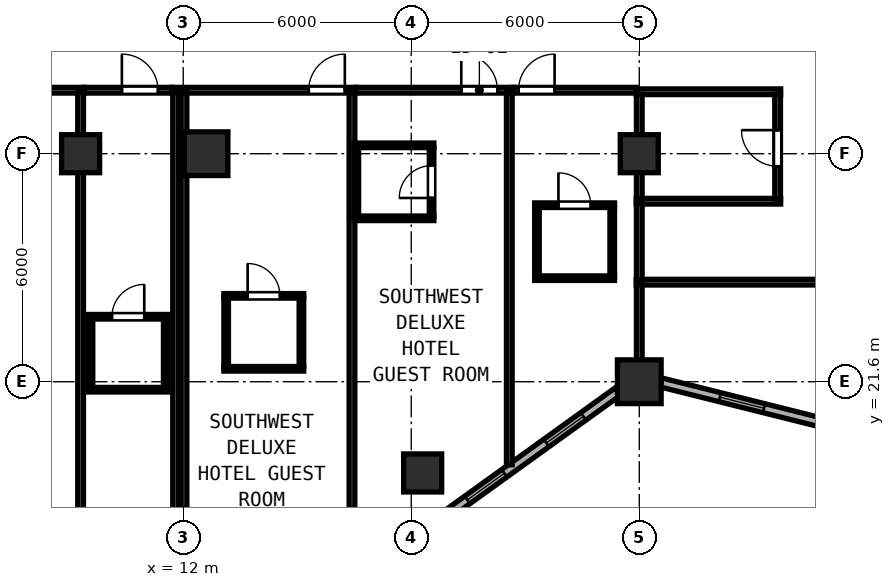
"""IFC4 building model, lengths in metres.
Left out: names, types, materials, properties, quantities, classifications, styles, units other than length and angle.
Written with IfcOpenShell. Run it as: python <this file> out.ifc"""

import sys

from ifc_helpers import new_model, si_unit, direction, frame, frame_2d, origin, origin_2d, place, context, subcontext, project, spatial, rectangle, hollow_rectangle, extrude, element, fill, save


model = new_model("IFC4")
c1 = context("Model", 3, precision=1e-05, world=origin(), true_north=direction((0.0, 1.0)))
c2 = subcontext(c1, "Body", "Model", "MODEL_VIEW")
j1 = project(units=[si_unit("LENGTHUNIT", "METRE"), si_unit("PLANEANGLEUNIT", "RADIAN")], contexts=[c1])
p1 = place(None, origin())
s1 = spatial("IfcSite", under=j1, at=p1, CompositionType="ELEMENT")
p2 = place(p1, origin())
s2 = spatial("IfcBuilding", under=s1, at=p2, CompositionType="ELEMENT")
p3 = place(p2, frame((0.0, 0.0, 62.8)))
s3 = spatial("IfcBuildingStorey", under=s2, at=p3, CompositionType="ELEMENT", Elevation=62.8)
for number, where, z_axis, x_axis in (
    (1, (24.0, 21.6, 0.0), (0.0, 0.0, 1.0), (1.0, 0.0, 0.0)),
    (2, (12.6, 27.6, 0.0), (0.0, 0.0, 1.0), (1.0, 0.0, 0.0)),
):
    element("IfcColumn", number, at=place(p3, frame(where, z_axis=z_axis, x_axis=x_axis)), inside=s3, PredefinedType="COLUMN", context=c2, shape_type="SweptSolid", body=[
        extrude(hollow_rectangle(XDim=1.15, YDim=1.15, WallThickness=0.042, at=origin_2d()), origin(), (0.0, 0.0, 1.0), 3.8),
    ])
for number, where, z_axis, x_axis in (
    (3, (24.0, 27.6, 0.0), (0.0, 0.0, 1.0), (1.0, 0.0, 0.0)),
    (4, (18.3, 19.2, 0.0), (0.0, 0.0, 1.0), (1.0, 0.0, 0.0)),
    (5, (9.3, 27.6, 0.0), (0.0, 0.0, 1.0), (1.0, 0.0, 0.0)),
):
    element("IfcColumn", number, at=place(p3, frame(where, z_axis=z_axis, x_axis=x_axis)), inside=s3, PredefinedType="COLUMN", context=c2, shape_type="SweptSolid", body=[
        extrude(hollow_rectangle(XDim=1.0, YDim=1.0, WallThickness=0.038, at=origin_2d()), origin(), (0.0, 0.0, 1.0), 3.8),
    ])
p4 = place(p3, frame((14.075, 14.602, 0.0), z_axis=(0.0, 0.0, 1.0), x_axis=(0.811543176492, 0.58429245476, 0.0)))
e6 = element("IfcWall", 6, at=p4, inside=s3, PredefinedType="SOLIDWALL", context=c2, shape_type="SweptSolid", body=[
    extrude(rectangle(XDim=11.531, YDim=0.24, at=frame_2d((5.765, 0.0))), origin(), (0.0, 0.0, 1.0), 3.097),
])
p5 = place(p4, frame((1.554, 0.0, 0.85)))
e7 = element("IfcOpeningElement", 7, at=p5, cuts=e6, PredefinedType="OPENING", context=c2, shape_type="SweptSolid", body=[
    extrude(rectangle(XDim=1.2, YDim=1.85, at=frame_2d((0.6, 0.925))), frame((0.0, 0.13, 0.0), z_axis=(0.0, -1.0, 0.0), x_axis=(1.0, 0.0, 0.0)), (0.0, 0.0, 1.0), 0.26),
])
p6 = place(p4, frame((6.656, 0.0, 0.85)))
e8 = element("IfcOpeningElement", 8, at=p6, cuts=e6, PredefinedType="OPENING", context=c2, shape_type="SweptSolid", body=[
    extrude(rectangle(XDim=1.2, YDim=1.85, at=frame_2d((0.6, 0.925))), frame((0.0, 0.13, 0.0), z_axis=(0.0, -1.0, 0.0), x_axis=(1.0, 0.0, 0.0)), (0.0, 0.0, 1.0), 0.26),
])
p7 = place(p4, frame((9.218, 0.0, 0.85)))
e9 = element("IfcOpeningElement", 9, at=p7, cuts=e6, PredefinedType="OPENING", context=c2, shape_type="SweptSolid", body=[
    extrude(rectangle(XDim=1.2, YDim=1.85, at=frame_2d((0.6, 0.925))), frame((0.0, 0.13, 0.0), z_axis=(0.0, -1.0, 0.0), x_axis=(1.0, 0.0, 0.0)), (0.0, 0.0, 1.0), 0.26),
])
p8 = place(p3, frame((24.567, 21.582, 0.0), z_axis=(0.0, 0.0, 1.0), x_axis=(0.970148978127, -0.24250971164, 0.0)))
e10 = element("IfcWall", 10, at=p8, inside=s3, PredefinedType="SOLIDWALL", context=c2, shape_type="SweptSolid", body=[
    extrude(rectangle(XDim=4.434, YDim=0.24, at=frame_2d((2.217, 0.0))), origin(), (0.0, 0.0, 1.0), 3.097),
])
p9 = place(p8, frame((1.6, 0.0, 0.85)))
e11 = element("IfcOpeningElement", 11, at=p9, cuts=e10, PredefinedType="OPENING", context=c2, shape_type="SweptSolid", body=[
    extrude(rectangle(XDim=1.2, YDim=1.85, at=frame_2d((0.6, 0.925))), frame((0.0, 0.13, 0.0), z_axis=(0.0, -1.0, 0.0), x_axis=(1.0, 0.0, 0.0)), (0.0, 0.0, 1.0), 0.26),
])
for number, where, z_axis, x_axis in (
    (12, (23.92, 29.23, 0.0), (0.0, 0.0, 1.0), (1.0, 0.0, 0.0)),
    (13, (23.92, 26.35, 0.0), (0.0, 0.0, 1.0), (1.0, 0.0, 0.0)),
):
    element("IfcWall", number, at=place(p3, frame(where, z_axis=z_axis, x_axis=x_axis)), inside=s3, PredefinedType="PARTITIONING", context=c2, shape_type="SweptSolid", body=[
        extrude(rectangle(XDim=3.8, YDim=0.15, at=frame_2d((1.9, 0.0))), origin(), (0.0, 0.0, 1.0), 3.6),
    ])
p10 = place(p3, frame((24.0, 26.41, 0.0), z_axis=(0.0, 0.0, 1.0), x_axis=(0.0, 1.0, 0.0)))
e14 = element("IfcWall", 14, at=p10, inside=s3, PredefinedType="PARTITIONING", context=c2, shape_type="SweptSolid", body=[
    extrude(rectangle(XDim=2.76, YDim=0.15, at=frame_2d((1.38, 0.0))), origin(), (0.0, 0.0, 1.0), 3.097),
])
p11 = place(p3, frame((27.64, 26.41, 0.0), z_axis=(0.0, 0.0, 1.0), x_axis=(0.0, 1.0, 0.0)))
e15 = element("IfcWall", 15, at=p11, inside=s3, PredefinedType="PARTITIONING", context=c2, shape_type="SweptSolid", body=[
    extrude(rectangle(XDim=2.76, YDim=0.15, at=frame_2d((1.38, 0.0))), origin(), (0.0, 0.0, 1.0), 3.6),
])
p12 = place(p11, frame((1.81, 0.0, 0.0), z_axis=(0.0, 0.0, 1.0), x_axis=(-1.0, 0.0, 0.0)))
e16 = element("IfcOpeningElement", 16, at=p12, cuts=e15, PredefinedType="OPENING", context=c2, shape_type="SweptSolid", body=[
    extrude(rectangle(XDim=0.95, YDim=2.12, at=frame_2d((0.475, 1.06))), frame((0.0, 0.085, 0.0), z_axis=(0.0, -1.0, 0.0), x_axis=(1.0, 0.0, 0.0)), (0.0, 0.0, 1.0), 0.17),
])
p13 = place(p3, frame((23.92, 24.22, 0.0), z_axis=(0.0, 0.0, 1.0), x_axis=(1.0, 0.0, 0.0)))
e17 = element("IfcWall", 17, at=p13, inside=s3, PredefinedType="PARTITIONING", context=c2, shape_type="SweptSolid", body=[
    extrude(rectangle(XDim=14.56, YDim=0.15, at=frame_2d((7.28, 0.0))), origin(), (0.0, 0.0, 1.0), 3.6),
])
p14 = place(p13, frame((9.445, 0.0, 0.0), z_axis=(0.0, 0.0, 1.0), x_axis=(-1.0, 0.0, 0.0)))
e18 = element("IfcOpeningElement", 18, at=p14, cuts=e17, PredefinedType="OPENING", context=c2, shape_type="SweptSolid", body=[
    extrude(rectangle(XDim=0.95, YDim=2.12, at=frame_2d((0.475, 1.06))), frame((0.0, 0.085, 0.0), z_axis=(0.0, -1.0, 0.0), x_axis=(1.0, 0.0, 0.0)), (0.0, 0.0, 1.0), 0.17),
])
p15 = place(p3, frame((24.0, 21.819, 0.0), z_axis=(0.0, 0.0, 1.0), x_axis=(0.0, 1.0, 0.0)))
e19 = element("IfcWall", 19, at=p15, inside=s3, PredefinedType="PARTITIONING", context=c2, shape_type="SweptSolid", body=[
    extrude(rectangle(XDim=2.341, YDim=0.15, at=frame_2d((1.171, 0.0))), origin(), (0.0, 0.0, 1.0), 3.097),
])
p16 = place(p3, frame((11.7, 29.27, 0.0), z_axis=(0.0, 0.0, 1.0), x_axis=(1.0, 0.0, 0.0)))
e20 = element("IfcWall", 20, at=p16, inside=s3, PredefinedType="PARTITIONING", context=c2, shape_type="SweptSolid", body=[
    extrude(rectangle(XDim=4.84, YDim=0.15, at=frame_2d((2.42, 0.0))), origin(), (0.0, 0.0, 1.0), 3.6),
])
p17 = place(p16, frame((4.552, 0.0, 0.0), z_axis=(0.0, 0.0, 1.0), x_axis=(-1.0, 0.0, 0.0)))
e21 = element("IfcOpeningElement", 21, at=p17, cuts=e20, PredefinedType="OPENING", context=c2, shape_type="SweptSolid", body=[
    extrude(rectangle(XDim=0.95, YDim=2.15, at=frame_2d((0.475, 1.075))), frame((0.0, 0.085, 0.0), z_axis=(0.0, -1.0, 0.0), x_axis=(1.0, 0.0, 0.0)), (0.0, 0.0, 1.0), 0.17),
])
p18 = place(p3, frame((11.8, 16.642, 0.0), z_axis=(0.0, 0.0, 1.0), x_axis=(0.0, 1.0, 0.0)))
e22 = element("IfcWall", 22, at=p18, inside=s3, PredefinedType="PARTITIONING", context=c2, shape_type="SweptSolid", body=[
    extrude(rectangle(XDim=12.568, YDim=0.15, at=frame_2d((6.284, 0.0))), origin(), (0.0, 0.0, 1.0), 3.6),
])
p19 = place(p3, frame((16.44, 16.434, 0.0), z_axis=(0.0, 0.0, 1.0), x_axis=(0.0, 1.0, 0.0)))
e23 = element("IfcWall", 23, at=p19, inside=s3, PredefinedType="PARTITIONING", context=c2, shape_type="SweptSolid", body=[
    extrude(rectangle(XDim=12.776, YDim=0.15, at=frame_2d((6.388, 0.0))), origin(), (0.0, 0.0, 1.0), 3.6),
])
p20 = place(p3, frame((13.07, 23.86, 0.0), z_axis=(0.0, 0.0, 1.0), x_axis=(1.0, 0.0, 0.0)))
e24 = element("IfcWall", 24, at=p20, inside=s3, PredefinedType="PARTITIONING", context=c2, shape_type="SweptSolid", body=[
    extrude(rectangle(XDim=2.1, YDim=0.12, at=frame_2d((1.05, 0.0))), origin(), (0.0, 0.0, 1.0), 3.6),
])
p21 = place(p20, frame((1.475, 0.0, 0.0), z_axis=(0.0, 0.0, 1.0), x_axis=(-1.0, 0.0, 0.0)))
e25 = element("IfcOpeningElement", 25, at=p21, cuts=e24, PredefinedType="OPENING", context=c2, shape_type="SweptSolid", body=[
    extrude(rectangle(XDim=0.85, YDim=2.1, at=frame_2d((0.425, 1.05))), frame((0.0, 0.07, 0.0), z_axis=(0.0, -1.0, 0.0), x_axis=(1.0, 0.0, 0.0)), (0.0, 0.0, 1.0), 0.14),
])
p22 = place(p3, frame((13.07, 21.94, 0.0), z_axis=(0.0, 0.0, 1.0), x_axis=(1.0, 0.0, 0.0)))
e26 = element("IfcWall", 26, at=p22, inside=s3, PredefinedType="PARTITIONING", context=c2, shape_type="SweptSolid", body=[
    extrude(rectangle(XDim=2.1, YDim=0.12, at=frame_2d((1.05, 0.0))), origin(), (0.0, 0.0, 1.0), 3.6),
])
for number, where, z_axis, x_axis in (
    (27, (13.13, 21.985, 0.0), (0.0, 0.0, 1.0), (0.0, 1.0, 0.0)),
    (28, (15.11, 21.985, 0.0), (0.0, 0.0, 1.0), (0.0, 1.0, 0.0)),
):
    element("IfcWall", number, at=place(p3, frame(where, z_axis=z_axis, x_axis=x_axis)), inside=s3, PredefinedType="PARTITIONING", context=c2, shape_type="SweptSolid", body=[
        extrude(rectangle(XDim=1.83, YDim=0.12, at=frame_2d((0.915, 0.0))), origin(), (0.0, 0.0, 1.0), 3.6),
    ])
p23 = place(p3, frame((16.542, 29.27, 0.0), z_axis=(0.0, 0.0, 1.0), x_axis=(1.0, 0.0, 0.0)))
e29 = element("IfcWall", 29, at=p23, inside=s3, PredefinedType="PARTITIONING", context=c2, shape_type="SweptSolid", body=[
    extrude(rectangle(XDim=4.138, YDim=0.15, at=frame_2d((2.069, 0.0))), origin(), (0.0, 0.0, 1.0), 3.6),
])
p24 = place(p23, frame((3.725, 0.0, 0.0), z_axis=(0.0, 0.0, 1.0), x_axis=(-1.0, 0.0, 0.0)))
e30 = element("IfcOpeningElement", 30, at=p24, cuts=e29, PredefinedType="OPENING", context=c2, shape_type="SweptSolid", body=[
    extrude(rectangle(XDim=0.95, YDim=2.15, at=frame_2d((0.475, 1.075))), frame((0.0, 0.085, 0.0), z_axis=(0.0, -1.0, 0.0), x_axis=(1.0, 0.0, 0.0)), (0.0, 0.0, 1.0), 0.17),
])
p25 = place(p3, frame((20.58, 19.415, 0.0), z_axis=(0.0, 0.0, 1.0), x_axis=(0.0, 1.0, 0.0)))
e31 = element("IfcWall", 31, at=p25, inside=s3, PredefinedType="PARTITIONING", context=c2, shape_type="SweptSolid", body=[
    extrude(rectangle(XDim=9.795, YDim=0.15, at=frame_2d((4.897, 0.0))), origin(), (0.0, 0.0, 1.0), 3.6),
])
p26 = place(p3, frame((16.5, 27.82, 0.0), z_axis=(0.0, 0.0, 1.0), x_axis=(1.0, 0.0, 0.0)))
e32 = element("IfcWall", 32, at=p26, inside=s3, PredefinedType="PARTITIONING", context=c2, shape_type="SweptSolid", body=[
    extrude(rectangle(XDim=2.095, YDim=0.12, at=frame_2d((1.047, 0.0))), origin(), (0.0, 0.0, 1.0), 3.097),
])
p27 = place(p3, frame((16.5, 25.9, 0.0), z_axis=(0.0, 0.0, 1.0), x_axis=(1.0, 0.0, 0.0)))
e33 = element("IfcWall", 33, at=p27, inside=s3, PredefinedType="PARTITIONING", context=c2, shape_type="SweptSolid", body=[
    extrude(rectangle(XDim=2.095, YDim=0.12, at=frame_2d((1.047, 0.0))), origin(), (0.0, 0.0, 1.0), 3.6),
])
p28 = place(p3, frame((16.555, 25.945, 0.0), z_axis=(0.0, 0.0, 1.0), x_axis=(0.0, 1.0, 0.0)))
e34 = element("IfcWall", 34, at=p28, inside=s3, PredefinedType="PARTITIONING", context=c2, shape_type="SweptSolid", body=[
    extrude(rectangle(XDim=1.83, YDim=0.12, at=frame_2d((0.915, 0.0))), origin(), (0.0, 0.0, 1.0), 3.6),
])
p29 = place(p3, frame((18.535, 25.945, 0.0), z_axis=(0.0, 0.0, 1.0), x_axis=(0.0, 1.0, 0.0)))
e35 = element("IfcWall", 35, at=p29, inside=s3, PredefinedType="PARTITIONING", context=c2, shape_type="SweptSolid", body=[
    extrude(rectangle(XDim=1.83, YDim=0.12, at=frame_2d((0.915, 0.0))), origin(), (0.0, 0.0, 1.0), 3.6),
])
p30 = place(p29, frame((0.49, 0.0, 0.0)))
e36 = element("IfcOpeningElement", 36, at=p30, cuts=e35, PredefinedType="OPENING", context=c2, shape_type="SweptSolid", body=[
    extrude(rectangle(XDim=0.85, YDim=2.1, at=frame_2d((0.425, 1.05))), frame((0.0, 0.07, 0.0), z_axis=(0.0, -1.0, 0.0), x_axis=(1.0, 0.0, 0.0)), (0.0, 0.0, 1.0), 0.14),
])
p31 = place(p3, frame((20.682, 29.27, 0.0), z_axis=(0.0, 0.0, 1.0), x_axis=(1.0, 0.0, 0.0)))
e37 = element("IfcWall", 37, at=p31, inside=s3, PredefinedType="PARTITIONING", context=c2, shape_type="SweptSolid", body=[
    extrude(rectangle(XDim=3.236, YDim=0.15, at=frame_2d((1.618, 0.0))), origin(), (0.0, 0.0, 1.0), 3.6),
])
p32 = place(p31, frame((1.09, 0.0, 0.0), z_axis=(0.0, 0.0, 1.0), x_axis=(-1.0, 0.0, 0.0)))
e38 = element("IfcOpeningElement", 38, at=p32, cuts=e37, PredefinedType="OPENING", context=c2, shape_type="SweptSolid", body=[
    extrude(rectangle(XDim=0.95, YDim=2.15, at=frame_2d((0.475, 1.075))), frame((0.0, 0.085, 0.0), z_axis=(0.0, -1.0, 0.0), x_axis=(1.0, 0.0, 0.0)), (0.0, 0.0, 1.0), 0.17),
])
p33 = place(p3, frame((24.0, 24.28, 0.0), z_axis=(0.0, 0.0, 1.0), x_axis=(0.0, 1.0, 0.0)))
e39 = element("IfcWall", 39, at=p33, inside=s3, PredefinedType="PARTITIONING", context=c2, shape_type="SweptSolid", body=[
    extrude(rectangle(XDim=2.01, YDim=0.15, at=frame_2d((1.005, 0.0))), origin(), (0.0, 0.0, 1.0), 3.097),
])
p34 = place(p3, frame((21.248, 26.245, 0.0), z_axis=(0.0, 0.0, 1.0), x_axis=(1.0, 0.0, 0.0)))
e40 = element("IfcWall", 40, at=p34, inside=s3, PredefinedType="PARTITIONING", context=c2, shape_type="SweptSolid", body=[
    extrude(rectangle(XDim=2.1, YDim=0.12, at=frame_2d((1.05, 0.0))), origin(), (0.0, 0.0, 1.0), 3.6),
])
p35 = place(p34, frame((1.475, 0.0, 0.0), z_axis=(0.0, 0.0, 1.0), x_axis=(-1.0, 0.0, 0.0)))
e41 = element("IfcOpeningElement", 41, at=p35, cuts=e40, PredefinedType="OPENING", context=c2, shape_type="SweptSolid", body=[
    extrude(rectangle(XDim=0.85, YDim=2.1, at=frame_2d((0.425, 1.05))), frame((0.0, 0.07, 0.0), z_axis=(0.0, -1.0, 0.0), x_axis=(1.0, 0.0, 0.0)), (0.0, 0.0, 1.0), 0.14),
])
p36 = place(p3, frame((21.248, 24.325, 0.0), z_axis=(0.0, 0.0, 1.0), x_axis=(1.0, 0.0, 0.0)))
e42 = element("IfcWall", 42, at=p36, inside=s3, PredefinedType="PARTITIONING", context=c2, shape_type="SweptSolid", body=[
    extrude(rectangle(XDim=2.1, YDim=0.12, at=frame_2d((1.05, 0.0))), origin(), (0.0, 0.0, 1.0), 3.6),
])
for number, where, z_axis, x_axis in (
    (43, (21.308, 24.37, 0.0), (0.0, 0.0, 1.0), (0.0, 1.0, 0.0)),
    (44, (23.288, 24.37, 0.0), (0.0, 0.0, 1.0), (0.0, 1.0, 0.0)),
):
    element("IfcWall", number, at=place(p3, frame(where, z_axis=z_axis, x_axis=x_axis)), inside=s3, PredefinedType="PARTITIONING", context=c2, shape_type="SweptSolid", body=[
        extrude(rectangle(XDim=1.83, YDim=0.12, at=frame_2d((0.915, 0.0))), origin(), (0.0, 0.0, 1.0), 3.6),
    ])
p37 = place(p3, frame((1.936, 29.27, 0.0), z_axis=(0.0, 0.0, 1.0), x_axis=(1.0, 0.0, 0.0)))
e45 = element("IfcWall", 45, at=p37, inside=s3, PredefinedType="PARTITIONING", context=c2, shape_type="SweptSolid", body=[
    extrude(rectangle(XDim=7.464, YDim=0.15, at=frame_2d((3.732, 0.0))), origin(), (0.0, 0.0, 1.0), 3.6),
])
p38 = place(p37, frame((6.168, 0.0, 0.0), z_axis=(0.0, 0.0, 1.0), x_axis=(-1.0, 0.0, 0.0)))
e46 = element("IfcOpeningElement", 46, at=p38, cuts=e45, PredefinedType="OPENING", context=c2, shape_type="SweptSolid", body=[
    extrude(rectangle(XDim=0.95, YDim=2.18, at=frame_2d((0.475, 1.09))), frame((0.0, 0.085, 0.0), z_axis=(0.0, -1.0, 0.0), x_axis=(1.0, 0.0, 0.0)), (0.0, 0.0, 1.0), 0.17),
])
p39 = place(p3, frame((9.3, 12.188, 0.0), z_axis=(0.0, 0.0, 1.0), x_axis=(0.0, 1.0, 0.0)))
e47 = element("IfcWall", 47, at=p39, inside=s3, PredefinedType="PARTITIONING", context=c2, shape_type="SweptSolid", body=[
    extrude(rectangle(XDim=17.022, YDim=0.15, at=frame_2d((8.511, 0.0))), origin(), (0.0, 0.0, 1.0), 3.6),
])
p40 = place(p3, frame((9.402, 29.27, 0.0), z_axis=(0.0, 0.0, 1.0), x_axis=(1.0, 0.0, 0.0)))
e48 = element("IfcWall", 48, at=p40, inside=s3, PredefinedType="PARTITIONING", context=c2, shape_type="SweptSolid", body=[
    extrude(rectangle(XDim=2.296, YDim=0.15, at=frame_2d((1.148, 0.0))), origin(), (0.0, 0.0, 1.0), 3.6),
])
p41 = place(p40, frame((1.934, 0.0, 0.0), z_axis=(0.0, 0.0, 1.0), x_axis=(-1.0, 0.0, 0.0)))
e49 = element("IfcOpeningElement", 49, at=p41, cuts=e48, PredefinedType="OPENING", context=c2, shape_type="SweptSolid", body=[
    extrude(rectangle(XDim=0.95, YDim=2.15, at=frame_2d((0.475, 1.075))), frame((0.0, 0.085, 0.0), z_axis=(0.0, -1.0, 0.0), x_axis=(1.0, 0.0, 0.0)), (0.0, 0.0, 1.0), 0.17),
])
p42 = place(p3, frame((12.02, 16.612, 0.0), z_axis=(0.0, 0.0, 1.0), x_axis=(0.0, 1.0, 0.0)))
e50 = element("IfcWall", 50, at=p42, inside=s3, PredefinedType="PARTITIONING", context=c2, shape_type="SweptSolid", body=[
    extrude(rectangle(XDim=12.598, YDim=0.15, at=frame_2d((6.299, 0.0))), origin(), (0.0, 0.0, 1.0), 3.6),
])
p43 = place(p3, frame((9.5, 23.31, 0.0), z_axis=(0.0, 0.0, 1.0), x_axis=(1.0, 0.0, 0.0)))
e51 = element("IfcWall", 51, at=p43, inside=s3, PredefinedType="PARTITIONING", context=c2, shape_type="SweptSolid", body=[
    extrude(rectangle(XDim=2.1, YDim=0.12, at=frame_2d((1.05, 0.0))), origin(), (0.0, 0.0, 1.0), 3.6),
])
p44 = place(p43, frame((1.475, 0.0, 0.0), z_axis=(0.0, 0.0, 1.0), x_axis=(-1.0, 0.0, 0.0)))
e52 = element("IfcOpeningElement", 52, at=p44, cuts=e51, PredefinedType="OPENING", context=c2, shape_type="SweptSolid", body=[
    extrude(rectangle(XDim=0.85, YDim=2.1, at=frame_2d((0.425, 1.05))), frame((0.0, 0.07, 0.0), z_axis=(0.0, -1.0, 0.0), x_axis=(1.0, 0.0, 0.0)), (0.0, 0.0, 1.0), 0.14),
])
p45 = place(p3, frame((9.5, 21.39, 0.0), z_axis=(0.0, 0.0, 1.0), x_axis=(1.0, 0.0, 0.0)))
e53 = element("IfcWall", 53, at=p45, inside=s3, PredefinedType="PARTITIONING", context=c2, shape_type="SweptSolid", body=[
    extrude(rectangle(XDim=2.1, YDim=0.12, at=frame_2d((1.05, 0.0))), origin(), (0.0, 0.0, 1.0), 3.6),
])
for number, where, z_axis, x_axis in (
    (54, (9.56, 21.435, 0.0), (0.0, 0.0, 1.0), (0.0, 1.0, 0.0)),
    (55, (11.54, 21.435, 0.0), (0.0, 0.0, 1.0), (0.0, 1.0, 0.0)),
):
    element("IfcWall", number, at=place(p3, frame(where, z_axis=z_axis, x_axis=x_axis)), inside=s3, PredefinedType="PARTITIONING", context=c2, shape_type="SweptSolid", body=[
        extrude(rectangle(XDim=1.83, YDim=0.12, at=frame_2d((0.915, 0.0))), origin(), (0.0, 0.0, 1.0), 3.6),
    ])
p46 = place(p6, origin())
e56 = element("IfcWindow", 56, at=p46, inside=s3, PartitioningType="SINGLE_PANEL", PredefinedType="WINDOW", context=c2, shape_type="SweptSolid", body=[
    extrude(rectangle(XDim=1.2, YDim=1.85, at=frame_2d((0.6, 0.925))), frame((0.0, 0.03, 0.0), z_axis=(0.0, -1.0, 0.0), x_axis=(1.0, 0.0, 0.0)), (0.0, 0.0, 1.0), 0.06),
])
fill(e8, e56)
p47 = place(p9, origin())
e57 = element("IfcWindow", 57, at=p47, inside=s3, PartitioningType="SINGLE_PANEL", PredefinedType="WINDOW", context=c2, shape_type="SweptSolid", body=[
    extrude(rectangle(XDim=1.2, YDim=1.85, at=frame_2d((0.6, 0.925))), frame((0.0, 0.03, 0.0), z_axis=(0.0, -1.0, 0.0), x_axis=(1.0, 0.0, 0.0)), (0.0, 0.0, 1.0), 0.06),
])
fill(e11, e57)
p48 = place(p12, origin())
e58 = element("IfcDoor", 58, at=p48, inside=s3, OperationType="SINGLE_SWING_LEFT", PredefinedType="DOOR", context=c2, shape_type="SweptSolid", body=[
    extrude(rectangle(XDim=0.95, YDim=2.12, at=frame_2d((0.475, 1.06))), frame((0.0, 0.025, 0.0), z_axis=(0.0, -1.0, 0.0), x_axis=(1.0, 0.0, 0.0)), (0.0, 0.0, 1.0), 0.05),
])
fill(e16, e58)
p49 = place(p17, origin())
e59 = element("IfcDoor", 59, at=p49, inside=s3, OperationType="SINGLE_SWING_LEFT", PredefinedType="DOOR", context=c2, shape_type="SweptSolid", body=[
    extrude(rectangle(XDim=0.95, YDim=2.15, at=frame_2d((0.475, 1.075))), frame((0.0, 0.025, 0.0), z_axis=(0.0, -1.0, 0.0), x_axis=(1.0, 0.0, 0.0)), (0.0, 0.0, 1.0), 0.05),
])
fill(e21, e59)
p50 = place(p21, origin())
e60 = element("IfcDoor", 60, at=p50, inside=s3, OperationType="SINGLE_SWING_RIGHT", PredefinedType="DOOR", context=c2, shape_type="SweptSolid", body=[
    extrude(rectangle(XDim=0.85, YDim=2.1, at=frame_2d((0.425, 1.05))), frame((0.0, 0.025, 0.0), z_axis=(0.0, -1.0, 0.0), x_axis=(1.0, 0.0, 0.0)), (0.0, 0.0, 1.0), 0.05),
])
fill(e25, e60)
p51 = place(p24, origin())
e61 = element("IfcDoor", 61, at=p51, inside=s3, OperationType="SINGLE_SWING_RIGHT", PredefinedType="DOOR", context=c2, shape_type="SweptSolid", body=[
    extrude(rectangle(XDim=0.95, YDim=2.15, at=frame_2d((0.475, 1.075))), frame((0.0, 0.025, 0.0), z_axis=(0.0, -1.0, 0.0), x_axis=(1.0, 0.0, 0.0)), (0.0, 0.0, 1.0), 0.05),
])
fill(e30, e61)
p52 = place(p30, origin())
e62 = element("IfcDoor", 62, at=p52, inside=s3, OperationType="SINGLE_SWING_LEFT", PredefinedType="DOOR", context=c2, shape_type="SweptSolid", body=[
    extrude(rectangle(XDim=0.85, YDim=2.1, at=frame_2d((0.425, 1.05))), frame((0.0, 0.025, 0.0), z_axis=(0.0, -1.0, 0.0), x_axis=(1.0, 0.0, 0.0)), (0.0, 0.0, 1.0), 0.05),
])
fill(e36, e62)
p53 = place(p32, origin())
e63 = element("IfcDoor", 63, at=p53, inside=s3, OperationType="SINGLE_SWING_LEFT", PredefinedType="DOOR", context=c2, shape_type="SweptSolid", body=[
    extrude(rectangle(XDim=0.95, YDim=2.15, at=frame_2d((0.475, 1.075))), frame((0.0, 0.025, 0.0), z_axis=(0.0, -1.0, 0.0), x_axis=(1.0, 0.0, 0.0)), (0.0, 0.0, 1.0), 0.05),
])
fill(e38, e63)
p54 = place(p35, origin())
e64 = element("IfcDoor", 64, at=p54, inside=s3, OperationType="SINGLE_SWING_RIGHT", PredefinedType="DOOR", context=c2, shape_type="SweptSolid", body=[
    extrude(rectangle(XDim=0.85, YDim=2.1, at=frame_2d((0.425, 1.05))), frame((0.0, 0.025, 0.0), z_axis=(0.0, -1.0, 0.0), x_axis=(1.0, 0.0, 0.0)), (0.0, 0.0, 1.0), 0.05),
])
fill(e41, e64)
p55 = place(p41, origin())
e65 = element("IfcDoor", 65, at=p55, inside=s3, OperationType="SINGLE_SWING_RIGHT", PredefinedType="DOOR", context=c2, shape_type="SweptSolid", body=[
    extrude(rectangle(XDim=0.95, YDim=2.15, at=frame_2d((0.475, 1.075))), frame((0.0, 0.025, 0.0), z_axis=(0.0, -1.0, 0.0), x_axis=(1.0, 0.0, 0.0)), (0.0, 0.0, 1.0), 0.05),
])
fill(e49, e65)
p56 = place(p44, origin())
e66 = element("IfcDoor", 66, at=p56, inside=s3, OperationType="SINGLE_SWING_LEFT", PredefinedType="DOOR", context=c2, shape_type="SweptSolid", body=[
    extrude(rectangle(XDim=0.85, YDim=2.1, at=frame_2d((0.425, 1.05))), frame((0.0, 0.025, 0.0), z_axis=(0.0, -1.0, 0.0), x_axis=(1.0, 0.0, 0.0)), (0.0, 0.0, 1.0), 0.05),
])
fill(e52, e66)
p57 = place(p7, origin())
e67 = element("IfcWindow", 67, at=p57, inside=s3, PartitioningType="SINGLE_PANEL", PredefinedType="WINDOW", context=c2, shape_type="SweptSolid", body=[
    extrude(rectangle(XDim=1.2, YDim=1.85, at=frame_2d((0.6, 0.925))), frame((0.0, 0.03, 0.0), z_axis=(0.0, -1.0, 0.0), x_axis=(1.0, 0.0, 0.0)), (0.0, 0.0, 1.0), 0.06),
])
fill(e9, e67)
save(model, sys.argv[1])
